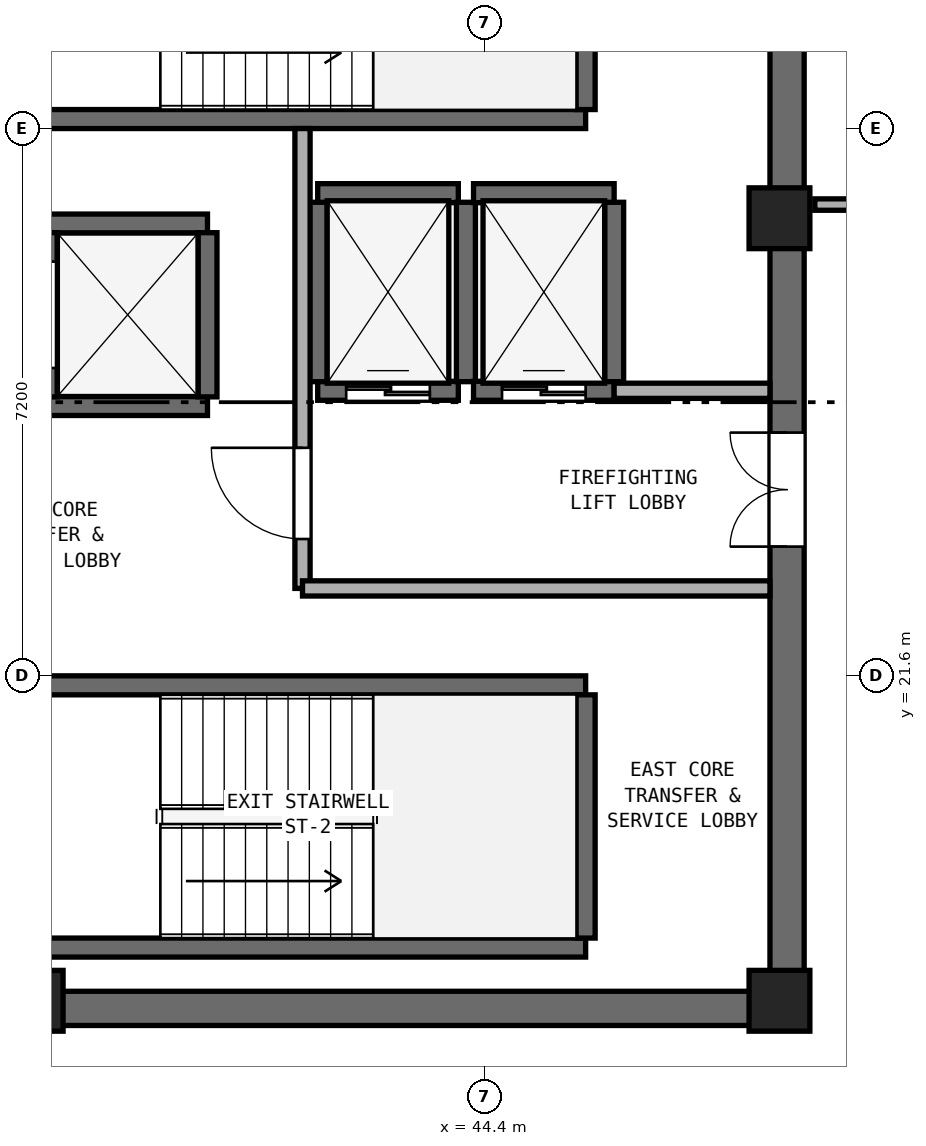
"""IFC4 building model, lengths in metres.
Left out: names, types, materials, properties, quantities, classifications, styles, units other than length and angle.
Written with IfcOpenShell. Run it as: python <this file> out.ifc"""

import sys

from ifc_helpers import new_model, si_unit, direction, frame, frame_2d, origin, origin_2d, place, context, subcontext, project, spatial, rectangle, extrude, element, fill, save


model = new_model("IFC4")
c1 = context("Model", 3, precision=1e-05, world=origin(), true_north=direction((0.0, 1.0)))
c2 = subcontext(c1, "Body", "Model", "MODEL_VIEW")
j1 = project(units=[si_unit("LENGTHUNIT", "METRE"), si_unit("PLANEANGLEUNIT", "RADIAN")], contexts=[c1])
p1 = place(None, origin())
s1 = spatial("IfcSite", under=j1, at=p1, CompositionType="ELEMENT")
p2 = place(p1, origin())
s2 = spatial("IfcBuilding", under=s1, at=p2, CompositionType="ELEMENT")
p3 = place(p2, frame((0.0, 0.0, 244.0)))
s3 = spatial("IfcBuildingStorey", under=s2, at=p3, CompositionType="ELEMENT", Elevation=244.0)
p4 = place(p3, frame((25.4, 17.225, 0.0), z_axis=(0.0, 0.0, 1.0), x_axis=(1.0, 0.0, 0.0)))
e1 = element("IfcWall", 1, at=p4, inside=s3, PredefinedType="SHEAR", context=c2, shape_type="SweptSolid", body=[
    extrude(rectangle(XDim=23.2, YDim=0.45, at=frame_2d((11.6, 0.0))), origin(), (0.0, 0.0, 1.0), 3.51),
])
p5 = place(p3, frame((48.375, 17.45, 0.0), z_axis=(0.0, 0.0, 1.0), x_axis=(0.0, 1.0, 0.0)))
e2 = element("IfcWall", 2, at=p5, inside=s3, PredefinedType="SHEAR", context=c2, shape_type="SweptSolid", body=[
    extrude(rectangle(XDim=15.5, YDim=0.45, at=frame_2d((7.75, 0.0))), origin(), (0.0, 0.0, 1.0), 3.51),
])
p6 = place(p5, frame((5.85, 0.0, 0.0)))
e3 = element("IfcOpeningElement", 3, at=p6, cuts=e2, PredefinedType="OPENING", context=c2, shape_type="SweptSolid", body=[
    extrude(rectangle(XDim=1.5, YDim=2.15, at=frame_2d((0.75, 1.075))), frame((0.0, 0.235, 0.0), z_axis=(0.0, -1.0, 0.0), x_axis=(1.0, 0.0, 0.0)), (0.0, 0.0, 1.0), 0.47),
])
for number, where, z_axis, x_axis in (
    (4, (38.45, 17.325, 0.0), (0.0, 0.0, 1.0), (1.0, 0.0, 0.0)),
    (5, (48.275, 17.325, 0.0), (0.0, 0.0, 1.0), (1.0, 0.0, 0.0)),
    (6, (48.275, 27.62, 0.0), (0.0, 0.0, 1.0), (1.0, 0.0, 0.0)),
):
    element("IfcColumn", number, at=place(p3, frame(where, z_axis=z_axis, x_axis=x_axis)), inside=s3, PredefinedType="PILASTER", context=c2, shape_type="SweptSolid", body=[
        extrude(rectangle(XDim=0.8, YDim=0.8, at=origin_2d()), origin(), (0.0, 0.0, 1.0), 3.8),
    ])
p7 = place(p3, frame((38.425, 28.925, 0.0), z_axis=(0.0, 0.0, 1.0), x_axis=(1.0, 0.0, 0.0)))
e7 = element("IfcWall", 7, at=p7, inside=s3, PredefinedType="SHEAR", context=c2, shape_type="SweptSolid", body=[
    extrude(rectangle(XDim=7.3, YDim=0.25, at=frame_2d((3.65, 0.0))), origin(), (0.0, 0.0, 1.0), 3.51),
])
p8 = place(p3, frame((45.725, 29.05, 0.0), z_axis=(0.0, 0.0, 1.0), x_axis=(0.0, 1.0, 0.0)))
e8 = element("IfcWall", 8, at=p8, inside=s3, PredefinedType="SHEAR", context=c2, shape_type="SweptSolid", body=[
    extrude(rectangle(XDim=3.2, YDim=0.25, at=frame_2d((1.6, 0.0))), origin(), (0.0, 0.0, 1.0), 3.51),
])
for number, where, z_axis, x_axis in (
    (9, (38.425, 18.025, 0.0), (0.0, 0.0, 1.0), (1.0, 0.0, 0.0)),
    (10, (38.425, 21.475, 0.0), (0.0, 0.0, 1.0), (1.0, 0.0, 0.0)),
):
    element("IfcWall", number, at=place(p3, frame(where, z_axis=z_axis, x_axis=x_axis)), inside=s3, PredefinedType="SHEAR", context=c2, shape_type="SweptSolid", body=[
        extrude(rectangle(XDim=7.3, YDim=0.25, at=frame_2d((3.65, 0.0))), origin(), (0.0, 0.0, 1.0), 3.51),
    ])
p9 = place(p3, frame((45.725, 18.15, 0.0), z_axis=(0.0, 0.0, 1.0), x_axis=(0.0, 1.0, 0.0)))
e11 = element("IfcWall", 11, at=p9, inside=s3, PredefinedType="SHEAR", context=c2, shape_type="SweptSolid", body=[
    extrude(rectangle(XDim=3.2, YDim=0.25, at=frame_2d((1.6, 0.0))), origin(), (0.0, 0.0, 1.0), 3.51),
])
p10 = place(p3, frame((42.2, 25.35, 0.0), z_axis=(0.0, 0.0, 1.0), x_axis=(1.0, 0.0, 0.0)))
e12 = element("IfcWall", 12, at=p10, inside=s3, PredefinedType="SHEAR", context=c2, shape_type="SweptSolid", body=[
    extrude(rectangle(XDim=1.85, YDim=0.25, at=frame_2d((0.925, 0.0))), origin(), (0.0, 0.0, 1.0), 3.51),
])
p11 = place(p10, frame((0.375, 0.0, 0.0)))
e13 = element("IfcOpeningElement", 13, at=p11, cuts=e12, PredefinedType="OPENING", context=c2, shape_type="SweptSolid", body=[
    extrude(rectangle(XDim=1.1, YDim=2.15, at=frame_2d((0.55, 1.075))), frame((0.0, 0.135, 0.0), z_axis=(0.0, -1.0, 0.0), x_axis=(1.0, 0.0, 0.0)), (0.0, 0.0, 1.0), 0.27),
])
p12 = place(p3, frame((42.2, 27.95, 0.0), z_axis=(0.0, 0.0, 1.0), x_axis=(1.0, 0.0, 0.0)))
e14 = element("IfcWall", 14, at=p12, inside=s3, PredefinedType="SHEAR", context=c2, shape_type="SweptSolid", body=[
    extrude(rectangle(XDim=1.85, YDim=0.25, at=frame_2d((0.925, 0.0))), origin(), (0.0, 0.0, 1.0), 3.51),
])
for number, where, z_axis, x_axis in (
    (15, (42.2, 25.47, 0.0), (0.0, 0.0, 1.0), (0.0, 1.0, 0.0)),
    (16, (44.15, 25.47, 0.0), (0.0, 0.0, 1.0), (0.0, 1.0, 0.0)),
):
    element("IfcWall", number, at=place(p3, frame(where, z_axis=z_axis, x_axis=x_axis)), inside=s3, PredefinedType="SHEAR", context=c2, shape_type="SweptSolid", body=[
        extrude(rectangle(XDim=2.36, YDim=0.25, at=frame_2d((1.18, 0.0))), origin(), (0.0, 0.0, 1.0), 3.51),
    ])
p13 = place(p3, frame((44.25, 25.35, 0.0), z_axis=(0.0, 0.0, 1.0), x_axis=(1.0, 0.0, 0.0)))
e17 = element("IfcWall", 17, at=p13, inside=s3, PredefinedType="SHEAR", context=c2, shape_type="SweptSolid", body=[
    extrude(rectangle(XDim=1.85, YDim=0.25, at=frame_2d((0.925, 0.0))), origin(), (0.0, 0.0, 1.0), 3.51),
])
p14 = place(p13, frame((0.375, 0.0, 0.0)))
e18 = element("IfcOpeningElement", 18, at=p14, cuts=e17, PredefinedType="OPENING", context=c2, shape_type="SweptSolid", body=[
    extrude(rectangle(XDim=1.1, YDim=2.15, at=frame_2d((0.55, 1.075))), frame((0.0, 0.135, 0.0), z_axis=(0.0, -1.0, 0.0), x_axis=(1.0, 0.0, 0.0)), (0.0, 0.0, 1.0), 0.27),
])
p15 = place(p3, frame((44.25, 27.95, 0.0), z_axis=(0.0, 0.0, 1.0), x_axis=(1.0, 0.0, 0.0)))
e19 = element("IfcWall", 19, at=p15, inside=s3, PredefinedType="SHEAR", context=c2, shape_type="SweptSolid", body=[
    extrude(rectangle(XDim=1.85, YDim=0.25, at=frame_2d((0.925, 0.0))), origin(), (0.0, 0.0, 1.0), 3.51),
])
p16 = place(p3, frame((46.1, 25.47, 0.0), z_axis=(0.0, 0.0, 1.0), x_axis=(0.0, 1.0, 0.0)))
e20 = element("IfcWall", 20, at=p16, inside=s3, PredefinedType="SHEAR", context=c2, shape_type="SweptSolid", body=[
    extrude(rectangle(XDim=2.36, YDim=0.25, at=frame_2d((1.18, 0.0))), origin(), (0.0, 0.0, 1.0), 3.51),
])
for number, where, z_axis, x_axis in (
    (21, (38.65, 25.15, 0.0), (0.0, 0.0, 1.0), (1.0, 0.0, 0.0)),
    (22, (38.65, 27.55, 0.0), (0.0, 0.0, 1.0), (1.0, 0.0, 0.0)),
):
    element("IfcWall", number, at=place(p3, frame(where, z_axis=z_axis, x_axis=x_axis)), inside=s3, PredefinedType="SHEAR", context=c2, shape_type="SweptSolid", body=[
        extrude(rectangle(XDim=2.1, YDim=0.25, at=frame_2d((1.05, 0.0))), origin(), (0.0, 0.0, 1.0), 3.51),
    ])
p17 = place(p3, frame((38.65, 25.27, 0.0), z_axis=(0.0, 0.0, 1.0), x_axis=(0.0, 1.0, 0.0)))
e23 = element("IfcWall", 23, at=p17, inside=s3, PredefinedType="SHEAR", context=c2, shape_type="SweptSolid", body=[
    extrude(rectangle(XDim=2.16, YDim=0.25, at=frame_2d((1.08, 0.0))), origin(), (0.0, 0.0, 1.0), 3.51),
])
p18 = place(p17, frame((0.38, 0.0, 0.0)))
e24 = element("IfcOpeningElement", 24, at=p18, cuts=e23, PredefinedType="OPENING", context=c2, shape_type="SweptSolid", body=[
    extrude(rectangle(XDim=1.4, YDim=2.2, at=frame_2d((0.7, 1.1))), frame((0.0, 0.135, 0.0), z_axis=(0.0, -1.0, 0.0), x_axis=(1.0, 0.0, 0.0)), (0.0, 0.0, 1.0), 0.27),
])
p19 = place(p3, frame((40.75, 25.27, 0.0), z_axis=(0.0, 0.0, 1.0), x_axis=(0.0, 1.0, 0.0)))
e25 = element("IfcWall", 25, at=p19, inside=s3, PredefinedType="SHEAR", context=c2, shape_type="SweptSolid", body=[
    extrude(rectangle(XDim=2.16, YDim=0.25, at=frame_2d((1.08, 0.0))), origin(), (0.0, 0.0, 1.0), 3.51),
])
p20 = place(p3, frame((42.0, 22.75, 0.0), z_axis=(0.0, 0.0, 1.0), x_axis=(0.0, 1.0, 0.0)))
e26 = element("IfcWall", 26, at=p20, inside=s3, PredefinedType="SOLIDWALL", context=c2, shape_type="SweptSolid", body=[
    extrude(rectangle(XDim=6.05, YDim=0.2, at=frame_2d((3.025, 0.0))), origin(), (0.0, 0.0, 1.0), 3.51),
])
p21 = place(p20, frame((0.65, 0.0, 0.0)))
e27 = element("IfcOpeningElement", 27, at=p21, cuts=e26, PredefinedType="OPENING", context=c2, shape_type="SweptSolid", body=[
    extrude(rectangle(XDim=1.2, YDim=2.15, at=frame_2d((0.6, 1.075))), frame((0.0, 0.11, 0.0), z_axis=(0.0, -1.0, 0.0), x_axis=(1.0, 0.0, 0.0)), (0.0, 0.0, 1.0), 0.22),
])
p22 = place(p3, frame((42.0, 22.75, 0.0), z_axis=(0.0, 0.0, 1.0), x_axis=(1.0, 0.0, 0.0)))
e28 = element("IfcWall", 28, at=p22, inside=s3, PredefinedType="SOLIDWALL", context=c2, shape_type="SweptSolid", body=[
    extrude(rectangle(XDim=6.15, YDim=0.2, at=frame_2d((3.075, 0.0))), origin(), (0.0, 0.0, 1.0), 3.51),
])
p23 = place(p3, frame((46.1, 25.35, 0.0), z_axis=(0.0, 0.0, 1.0), x_axis=(1.0, 0.0, 0.0)))
e29 = element("IfcWall", 29, at=p23, inside=s3, PredefinedType="SOLIDWALL", context=c2, shape_type="SweptSolid", body=[
    extrude(rectangle(XDim=2.05, YDim=0.2, at=frame_2d((1.025, 0.0))), origin(), (0.0, 0.0, 1.0), 3.51),
])
p24 = place(p3, frame((48.74, 27.8, 0.0), z_axis=(0.0, 0.0, 1.0), x_axis=(1.0, 0.0, 0.0)))
e30 = element("IfcWall", 30, at=p24, inside=s3, PredefinedType="PARTITIONING", context=c2, shape_type="SweptSolid", body=[
    extrude(rectangle(XDim=2.81, YDim=0.15, at=frame_2d((1.405, 0.0))), origin(), (0.0, 0.0, 1.0), 3.51),
])
p25 = place(p11, origin())
e31 = element("IfcDoor", 31, at=p25, inside=s3, OperationType="DOUBLE_DOOR_SLIDING", PredefinedType="DOOR", context=c2, shape_type="SweptSolid", body=[
    extrude(rectangle(XDim=1.1, YDim=2.15, at=frame_2d((0.55, 1.075))), frame((0.0, 0.025, 0.0), z_axis=(0.0, -1.0, 0.0), x_axis=(1.0, 0.0, 0.0)), (0.0, 0.0, 1.0), 0.05),
])
fill(e13, e31)
p26 = place(p14, origin())
e32 = element("IfcDoor", 32, at=p26, inside=s3, OperationType="DOUBLE_DOOR_SLIDING", PredefinedType="DOOR", context=c2, shape_type="SweptSolid", body=[
    extrude(rectangle(XDim=1.1, YDim=2.15, at=frame_2d((0.55, 1.075))), frame((0.0, 0.025, 0.0), z_axis=(0.0, -1.0, 0.0), x_axis=(1.0, 0.0, 0.0)), (0.0, 0.0, 1.0), 0.05),
])
fill(e18, e32)
p27 = place(p21, origin())
e33 = element("IfcDoor", 33, at=p27, inside=s3, OperationType="SINGLE_SWING_RIGHT", PredefinedType="DOOR", context=c2, shape_type="SweptSolid", body=[
    extrude(rectangle(XDim=1.2, YDim=2.15, at=frame_2d((0.6, 1.075))), frame((0.0, 0.025, 0.0), z_axis=(0.0, -1.0, 0.0), x_axis=(1.0, 0.0, 0.0)), (0.0, 0.0, 1.0), 0.05),
])
fill(e27, e33)
p28 = place(p6, origin())
e34 = element("IfcDoor", 34, at=p28, inside=s3, OperationType="DOUBLE_DOOR_SINGLE_SWING", PredefinedType="DOOR", context=c2, shape_type="SweptSolid", body=[
    extrude(rectangle(XDim=1.5, YDim=2.15, at=frame_2d((0.75, 1.075))), frame((0.0, 0.025, 0.0), z_axis=(0.0, -1.0, 0.0), x_axis=(1.0, 0.0, 0.0)), (0.0, 0.0, 1.0), 0.05),
])
fill(e3, e34)
save(model, sys.argv[1])
